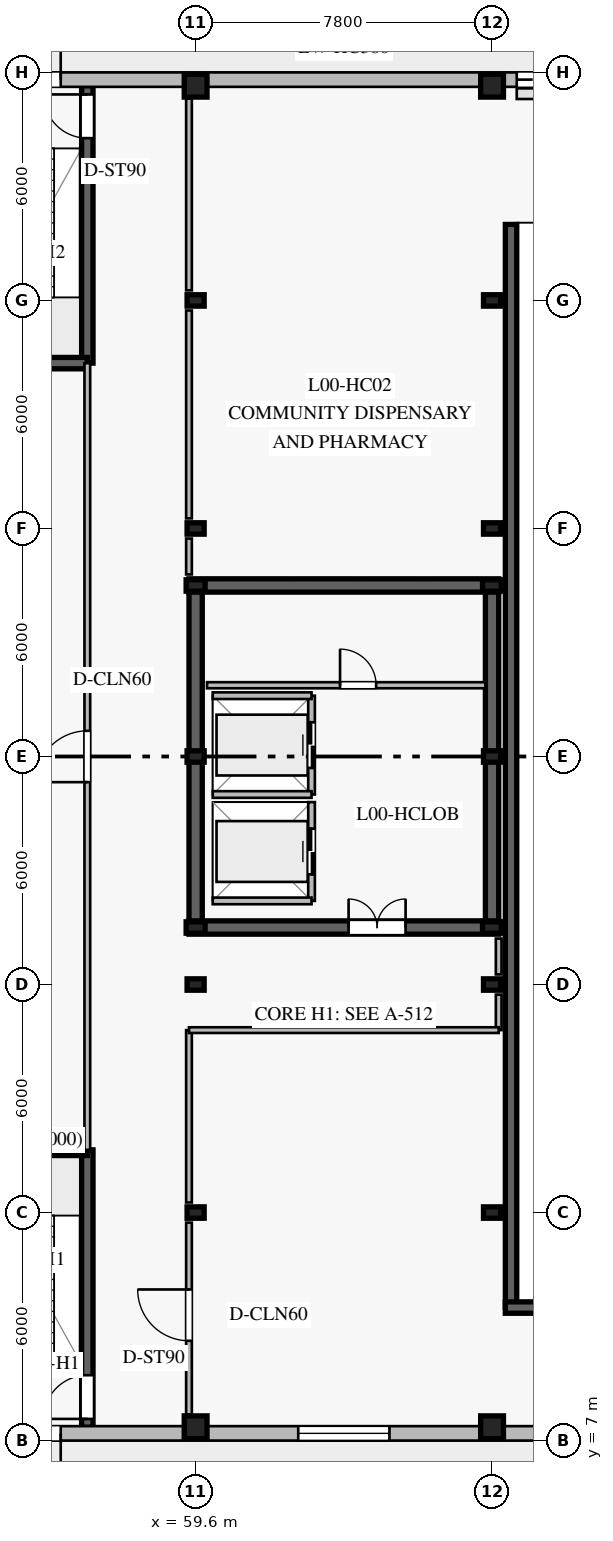
"""IFC4 building model, lengths in metres.
Left out: names, types, materials, properties, quantities, classifications, styles, units other than length and angle.
Written with IfcOpenShell. Run it as: python <this file> out.ifc"""

import sys

from ifc_helpers import new_model, si_unit, direction, frame, frame_2d, origin, origin_2d, place, context, subcontext, project, spatial, rectangle, i_section, extrude, element, fill, save


model = new_model("IFC4")
c1 = context("Model", 3, precision=1e-05, world=origin(), true_north=direction((0.0, 1.0)))
c2 = subcontext(c1, "Body", "Model", "MODEL_VIEW")
j1 = project(units=[si_unit("LENGTHUNIT", "METRE"), si_unit("PLANEANGLEUNIT", "RADIAN")], contexts=[c1])
p1 = place(None, origin())
s1 = spatial("IfcSite", under=j1, at=p1, CompositionType="ELEMENT")
p2 = place(p1, origin())
s2 = spatial("IfcBuilding", under=s1, at=p2, CompositionType="ELEMENT")
p3 = place(p2, origin())
s3 = spatial("IfcBuildingStorey", under=s2, at=p3, CompositionType="ELEMENT", Elevation=0.0)
p4 = place(p3, frame((67.9, 10.5, 0.0), z_axis=(0.0, 0.0, 1.0), x_axis=(0.0, 1.0, 0.0)))
e1 = element("IfcWall", 1, at=p4, inside=s3, PredefinedType="SOLIDWALL", context=c2, shape_type="SweptSolid", body=[
    extrude(rectangle(XDim=28.5, YDim=0.3, at=frame_2d((14.25, 0.0))), origin(), (0.0, 0.0, 1.0), 4.94),
])
p5 = place(p3, frame((67.75, 10.5, 0.0), z_axis=(0.0, 0.0, 1.0), x_axis=(1.0, 0.0, 0.0)))
e2 = element("IfcWall", 2, at=p5, inside=s3, PredefinedType="SOLIDWALL", context=c2, shape_type="SweptSolid", body=[
    extrude(rectangle(XDim=6.6, YDim=0.3, at=frame_2d((3.3, 0.0))), origin(), (0.0, 0.0, 1.0), 4.94),
])
p6 = place(p3, frame((59.425, 20.5, 0.0), z_axis=(0.0, 0.0, 1.0), x_axis=(1.0, 0.0, 0.0)))
e3 = element("IfcWall", 3, at=p6, inside=s3, PredefinedType="SHEAR", context=c2, shape_type="SweptSolid", body=[
    extrude(rectangle(XDim=8.15, YDim=0.35, at=frame_2d((4.075, 0.0))), origin(), (0.0, 0.0, 1.0), 4.94),
])
p7 = place(p6, frame((4.2, 0.0, 0.0)))
e4 = element("IfcOpeningElement", 4, at=p7, cuts=e3, PredefinedType="OPENING", context=c2, shape_type="SweptSolid", body=[
    extrude(rectangle(XDim=1.5, YDim=2.2, at=frame_2d((0.75, 1.1))), frame((0.0, 0.185, 0.0), z_axis=(0.0, -1.0, 0.0), x_axis=(1.0, 0.0, 0.0)), (0.0, 0.0, 1.0), 0.37),
])
p8 = place(p3, frame((67.575, 29.5, 0.0), z_axis=(0.0, 0.0, 1.0), x_axis=(-1.0, 0.0, 0.0)))
e5 = element("IfcWall", 5, at=p8, inside=s3, PredefinedType="SHEAR", context=c2, shape_type="SweptSolid", body=[
    extrude(rectangle(XDim=8.15, YDim=0.35, at=frame_2d((4.075, 0.0))), origin(), (0.0, 0.0, 1.0), 4.94),
])
for number, where, z_axis, x_axis in (
    (6, (59.6, 29.325, 0.0), (0.0, 0.0, 1.0), (0.0, -1.0, 0.0)),
    (7, (67.4, 20.675, 0.0), (0.0, 0.0, 1.0), (0.0, 1.0, 0.0)),
):
    element("IfcWall", number, at=place(p3, frame(where, z_axis=z_axis, x_axis=x_axis)), inside=s3, PredefinedType="SHEAR", context=c2, shape_type="SweptSolid", body=[
        extrude(rectangle(XDim=8.65, YDim=0.35, at=frame_2d((4.325, 0.0))), origin(), (0.0, 0.0, 1.0), 4.94),
    ])
for number, where, z_axis, x_axis in (
    (8, (59.6, 20.5, 0.0), (0.0, 0.0, 1.0), (1.0, 0.0, 0.0)),
    (9, (67.4, 20.5, 0.0), (0.0, 0.0, 1.0), (1.0, 0.0, 0.0)),
    (10, (67.4, 29.5, 0.0), (0.0, 0.0, 1.0), (1.0, 0.0, 0.0)),
    (11, (59.6, 29.5, 0.0), (0.0, 0.0, 1.0), (1.0, 0.0, 0.0)),
):
    element("IfcColumn", number, at=place(p3, frame(where, z_axis=z_axis, x_axis=x_axis)), inside=s3, PredefinedType="COLUMN", context=c2, shape_type="SweptSolid", body=[
        extrude(i_section(OverallWidth=0.3, OverallDepth=0.5, WebThickness=0.014, FlangeThickness=0.028, at=origin_2d()), origin(), (0.0, 0.0, 1.0), 5.2),
    ])
p9 = place(p3, frame((56.75, 7.35, 0.0), z_axis=(0.0, 0.0, 1.0), x_axis=(0.0, 1.0, 0.0)))
e12 = element("IfcWall", 12, at=p9, inside=s3, PredefinedType="SOLIDWALL", context=c2, shape_type="SweptSolid", body=[
    extrude(rectangle(XDim=7.3, YDim=0.3, at=frame_2d((3.65, 0.0))), origin(), (0.0, 0.0, 1.0), 4.94),
])
p10 = place(p9, frame((0.22, 0.0, 0.0)))
e13 = element("IfcOpeningElement", 13, at=p10, cuts=e12, PredefinedType="OPENING", context=c2, shape_type="SweptSolid", body=[
    extrude(rectangle(XDim=1.15, YDim=2.2, at=frame_2d((0.575, 1.1))), frame((0.0, 0.16, 0.0), z_axis=(0.0, -1.0, 0.0), x_axis=(1.0, 0.0, 0.0)), (0.0, 0.0, 1.0), 0.32),
])
p11 = place(p3, frame((53.4, 14.65, 0.0), z_axis=(0.0, 0.0, 1.0), x_axis=(1.0, 0.0, 0.0)))
e14 = element("IfcWall", 14, at=p11, inside=s3, PredefinedType="SOLIDWALL", context=c2, shape_type="SweptSolid", body=[
    extrude(rectangle(XDim=3.35, YDim=0.3, at=frame_2d((1.675, 0.0))), origin(), (0.0, 0.0, 1.0), 4.94),
])
p12 = place(p3, frame((56.75, 35.35, 0.0), z_axis=(0.0, 0.0, 1.0), x_axis=(0.0, 1.0, 0.0)))
e15 = element("IfcWall", 15, at=p12, inside=s3, PredefinedType="SOLIDWALL", context=c2, shape_type="SweptSolid", body=[
    extrude(rectangle(XDim=7.3, YDim=0.3, at=frame_2d((3.65, 0.0))), origin(), (0.0, 0.0, 1.0), 4.94),
])
p13 = place(p12, frame((5.92, 0.0, 0.0)))
e16 = element("IfcOpeningElement", 16, at=p13, cuts=e15, PredefinedType="OPENING", context=c2, shape_type="SweptSolid", body=[
    extrude(rectangle(XDim=1.15, YDim=2.2, at=frame_2d((0.575, 1.1))), frame((0.0, 0.16, 0.0), z_axis=(0.0, -1.0, 0.0), x_axis=(1.0, 0.0, 0.0)), (0.0, 0.0, 1.0), 0.32),
])
p14 = place(p3, frame((53.4, 35.35, 0.0), z_axis=(0.0, 0.0, 1.0), x_axis=(1.0, 0.0, 0.0)))
e17 = element("IfcWall", 17, at=p14, inside=s3, PredefinedType="SOLIDWALL", context=c2, shape_type="SweptSolid", body=[
    extrude(rectangle(XDim=3.35, YDim=0.3, at=frame_2d((1.675, 0.0))), origin(), (0.0, 0.0, 1.0), 4.94),
])
p15 = place(p3, frame((59.6, 7.35, 0.0), z_axis=(0.0, 0.0, 1.0), x_axis=(1.0, 0.0, 0.0)))
e18 = element("IfcColumn", 18, at=p15, inside=s3, PredefinedType="COLUMN", context=c2, shape_type="SweptSolid", body=[
    extrude(rectangle(XDim=0.6, YDim=0.6, at=origin_2d()), origin(), (0.0, 0.0, 1.0), 5.2),
])
for number, where, z_axis, x_axis in (
    (19, (59.6, 13.0, 0.0), (0.0, 0.0, 1.0), (1.0, 0.0, 0.0)),
    (20, (59.6, 19.0, 0.0), (0.0, 0.0, 1.0), (1.0, 0.0, 0.0)),
    (21, (59.6, 25.0, 0.0), (0.0, 0.0, 1.0), (1.0, 0.0, 0.0)),
    (22, (59.6, 31.0, 0.0), (0.0, 0.0, 1.0), (1.0, 0.0, 0.0)),
    (23, (59.6, 37.0, 0.0), (0.0, 0.0, 1.0), (1.0, 0.0, 0.0)),
):
    element("IfcColumn", number, at=place(p3, frame(where, z_axis=z_axis, x_axis=x_axis)), inside=s3, PredefinedType="COLUMN", context=c2, shape_type="SweptSolid", body=[
        extrude(i_section(OverallWidth=0.3, OverallDepth=0.45, WebThickness=0.014, FlangeThickness=0.026, at=origin_2d()), origin(), (0.0, 0.0, 1.0), 5.2),
    ])
for number, where, z_axis, x_axis in (
    (24, (59.6, 42.65, 0.0), (0.0, 0.0, 1.0), (1.0, 0.0, 0.0)),
    (25, (67.4, 7.35, 0.0), (0.0, 0.0, 1.0), (1.0, 0.0, 0.0)),
):
    element("IfcColumn", number, at=place(p3, frame(where, z_axis=z_axis, x_axis=x_axis)), inside=s3, PredefinedType="COLUMN", context=c2, shape_type="SweptSolid", body=[
        extrude(rectangle(XDim=0.6, YDim=0.6, at=origin_2d()), origin(), (0.0, 0.0, 1.0), 5.2),
    ])
for number, where, z_axis, x_axis in (
    (26, (67.4, 13.0, 0.0), (0.0, 0.0, 1.0), (1.0, 0.0, 0.0)),
    (27, (67.4, 19.0, 0.0), (0.0, 0.0, 1.0), (1.0, 0.0, 0.0)),
    (28, (67.4, 25.0, 0.0), (0.0, 0.0, 1.0), (1.0, 0.0, 0.0)),
    (29, (67.4, 31.0, 0.0), (0.0, 0.0, 1.0), (1.0, 0.0, 0.0)),
    (30, (67.4, 37.0, 0.0), (0.0, 0.0, 1.0), (1.0, 0.0, 0.0)),
):
    element("IfcColumn", number, at=place(p3, frame(where, z_axis=z_axis, x_axis=x_axis)), inside=s3, PredefinedType="COLUMN", context=c2, shape_type="SweptSolid", body=[
        extrude(i_section(OverallWidth=0.3, OverallDepth=0.45, WebThickness=0.014, FlangeThickness=0.026, at=origin_2d()), origin(), (0.0, 0.0, 1.0), 5.2),
    ])
p16 = place(p3, frame((67.4, 42.65, 0.0), z_axis=(0.0, 0.0, 1.0), x_axis=(1.0, 0.0, 0.0)))
e31 = element("IfcColumn", 31, at=p16, inside=s3, PredefinedType="COLUMN", context=c2, shape_type="SweptSolid", body=[
    extrude(rectangle(XDim=0.6, YDim=0.6, at=origin_2d()), origin(), (0.0, 0.0, 1.0), 5.2),
])
p17 = place(p3, frame((75.0, 7.19, 0.0), z_axis=(0.0, 0.0, 1.0), x_axis=(-1.0, 0.0, 0.0)))
e32 = element("IfcWall", 32, at=p17, inside=s3, PredefinedType="STANDARD", context=c2, shape_type="SweptSolid", body=[
    extrude(rectangle(XDim=23.0, YDim=0.38, at=frame_2d((11.5, 0.0))), origin(), (0.0, 0.0, 1.0), 4.94),
])
p18 = place(p17, frame((18.95, 0.0, 0.0)))
e33 = element("IfcOpeningElement", 33, at=p18, cuts=e32, PredefinedType="OPENING", context=c2, shape_type="SweptSolid", body=[
    extrude(rectangle(XDim=2.0, YDim=2.4, at=frame_2d((1.0, 1.2))), frame((0.0, 0.2, 0.0), z_axis=(0.0, -1.0, 0.0), x_axis=(1.0, 0.0, 0.0)), (0.0, 0.0, 1.0), 0.4),
])
p19 = place(p17, frame((10.3, 0.0, 0.95)))
e34 = element("IfcOpeningElement", 34, at=p19, cuts=e32, PredefinedType="OPENING", context=c2, shape_type="SweptSolid", body=[
    extrude(rectangle(XDim=2.4, YDim=1.8, at=frame_2d((1.2, 0.9))), frame((0.0, 0.2, 0.0), z_axis=(0.0, -1.0, 0.0), x_axis=(1.0, 0.0, 0.0)), (0.0, 0.0, 1.0), 0.4),
])
p20 = place(p3, frame((52.0, 42.81, 0.0), z_axis=(0.0, 0.0, 1.0), x_axis=(1.0, 0.0, 0.0)))
e35 = element("IfcWall", 35, at=p20, inside=s3, PredefinedType="STANDARD", context=c2, shape_type="SweptSolid", body=[
    extrude(rectangle(XDim=23.0, YDim=0.38, at=frame_2d((11.5, 0.0))), origin(), (0.0, 0.0, 1.0), 4.94),
])
p21 = place(p20, frame((2.05, 0.0, 0.0)))
e36 = element("IfcOpeningElement", 36, at=p21, cuts=e35, PredefinedType="OPENING", context=c2, shape_type="SweptSolid", body=[
    extrude(rectangle(XDim=2.0, YDim=2.4, at=frame_2d((1.0, 1.2))), frame((0.0, 0.2, 0.0), z_axis=(0.0, -1.0, 0.0), x_axis=(1.0, 0.0, 0.0)), (0.0, 0.0, 1.0), 0.4),
])
p22 = place(p20, frame((16.05, 0.0, 0.0)))
e37 = element("IfcOpeningElement", 37, at=p22, cuts=e35, PredefinedType="OPENING", context=c2, shape_type="SweptSolid", body=[
    extrude(rectangle(XDim=6.0, YDim=2.6, at=frame_2d((3.0, 1.3))), frame((0.0, 0.2, 0.0), z_axis=(0.0, -1.0, 0.0), x_axis=(1.0, 0.0, 0.0)), (0.0, 0.0, 1.0), 0.4),
])
p23 = place(p3, frame((62.65, 21.2, 0.0), z_axis=(0.0, 0.0, 1.0), x_axis=(0.0, 1.0, 0.0)))
e38 = element("IfcWall", 38, at=p23, inside=s3, PredefinedType="PARTITIONING", context=c2, shape_type="SweptSolid", body=[
    extrude(rectangle(XDim=2.6, YDim=0.175, at=frame_2d((1.3, 0.0))), origin(), (0.0, 0.0, 1.0), 4.94),
])
p24 = place(p23, frame((0.7, 0.0, 0.0)))
e39 = element("IfcOpeningElement", 39, at=p24, cuts=e38, PredefinedType="OPENING", context=c2, shape_type="SweptSolid", body=[
    extrude(rectangle(XDim=1.2, YDim=2.2, at=frame_2d((0.6, 1.1))), frame((0.0, 0.098, 0.0), z_axis=(0.0, -1.0, 0.0), x_axis=(1.0, 0.0, 0.0)), (0.0, 0.0, 1.0), 0.195),
])
p25 = place(p3, frame((60.05, 21.2, 0.0), z_axis=(0.0, 0.0, 1.0), x_axis=(1.0, 0.0, 0.0)))
e40 = element("IfcWall", 40, at=p25, inside=s3, PredefinedType="PARTITIONING", context=c2, shape_type="SweptSolid", body=[
    extrude(rectangle(XDim=2.6, YDim=0.175, at=frame_2d((1.3, 0.0))), origin(), (0.0, 0.0, 1.0), 4.94),
])
p26 = place(p3, frame((62.65, 24.0, 0.0), z_axis=(0.0, 0.0, 1.0), x_axis=(0.0, 1.0, 0.0)))
e41 = element("IfcWall", 41, at=p26, inside=s3, PredefinedType="PARTITIONING", context=c2, shape_type="SweptSolid", body=[
    extrude(rectangle(XDim=2.6, YDim=0.175, at=frame_2d((1.3, 0.0))), origin(), (0.0, 0.0, 1.0), 4.58),
])
p27 = place(p26, frame((0.7, 0.0, 0.0)))
e42 = element("IfcOpeningElement", 42, at=p27, cuts=e41, PredefinedType="OPENING", context=c2, shape_type="SweptSolid", body=[
    extrude(rectangle(XDim=1.2, YDim=2.2, at=frame_2d((0.6, 1.1))), frame((0.0, 0.098, 0.0), z_axis=(0.0, -1.0, 0.0), x_axis=(1.0, 0.0, 0.0)), (0.0, 0.0, 1.0), 0.195),
])
for number, where, z_axis, x_axis in (
    (43, (60.05, 24.0, 0.0), (0.0, 0.0, 1.0), (1.0, 0.0, 0.0)),
    (44, (60.05, 26.6, 0.0), (0.0, 0.0, 1.0), (1.0, 0.0, 0.0)),
):
    element("IfcWall", number, at=place(p3, frame(where, z_axis=z_axis, x_axis=x_axis)), inside=s3, PredefinedType="PARTITIONING", context=c2, shape_type="SweptSolid", body=[
        extrude(rectangle(XDim=2.6, YDim=0.175, at=frame_2d((1.3, 0.0))), origin(), (0.0, 0.0, 1.0), 4.94),
    ])
p28 = place(p3, frame((59.9, 26.875, 0.0), z_axis=(0.0, 0.0, 1.0), x_axis=(1.0, 0.0, 0.0)))
e45 = element("IfcWall", 45, at=p28, inside=s3, PredefinedType="PLUMBINGWALL", context=c2, shape_type="SweptSolid", body=[
    extrude(rectangle(XDim=7.325, YDim=0.16, at=frame_2d((3.663, 0.0))), origin(), (0.0, 0.0, 1.0), 4.58),
])
p29 = place(p28, frame((3.5, 0.0, 0.0)))
e46 = element("IfcOpeningElement", 46, at=p29, cuts=e45, PredefinedType="OPENING", context=c2, shape_type="SweptSolid", body=[
    extrude(rectangle(XDim=0.95, YDim=2.1, at=frame_2d((0.475, 1.05))), frame((0.0, 0.09, 0.0), z_axis=(0.0, -1.0, 0.0), x_axis=(1.0, 0.0, 0.0)), (0.0, 0.0, 1.0), 0.18),
])
p30 = place(p3, frame((56.75, 14.65, 0.0), z_axis=(0.0, 0.0, 1.0), x_axis=(0.0, 1.0, 0.0)))
e47 = element("IfcWall", 47, at=p30, inside=s3, PredefinedType="PARTITIONING", context=c2, shape_type="SweptSolid", body=[
    extrude(rectangle(XDim=20.7, YDim=0.15, at=frame_2d((10.35, 0.0))), origin(), (0.0, 0.0, 1.0), 4.94),
])
p31 = place(p30, frame((9.675, 0.0, 0.0)))
e48 = element("IfcOpeningElement", 48, at=p31, cuts=e47, PredefinedType="OPENING", context=c2, shape_type="SweptSolid", body=[
    extrude(rectangle(XDim=1.35, YDim=2.2, at=frame_2d((0.675, 1.1))), frame((0.0, 0.085, 0.0), z_axis=(0.0, -1.0, 0.0), x_axis=(1.0, 0.0, 0.0)), (0.0, 0.0, 1.0), 0.17),
])
p32 = place(p3, frame((59.425, 7.69, 0.0), z_axis=(0.0, 0.0, 1.0), x_axis=(0.0, 1.0, 0.0)))
e49 = element("IfcWall", 49, at=p32, inside=s3, PredefinedType="PARTITIONING", context=c2, shape_type="SweptSolid", body=[
    extrude(rectangle(XDim=5.045, YDim=0.15, at=frame_2d((2.522, 0.0))), origin(), (0.0, 0.0, 1.0), 4.58),
])
p33 = place(p32, frame((1.936, 0.0, 0.0)))
e50 = element("IfcOpeningElement", 50, at=p33, cuts=e49, PredefinedType="OPENING", context=c2, shape_type="SweptSolid", body=[
    extrude(rectangle(XDim=1.35, YDim=2.2, at=frame_2d((0.675, 1.1))), frame((0.0, 0.085, 0.0), z_axis=(0.0, -1.0, 0.0), x_axis=(1.0, 0.0, 0.0)), (0.0, 0.0, 1.0), 0.17),
])
p34 = place(p3, frame((59.425, 13.265, 0.0), z_axis=(0.0, 0.0, 1.0), x_axis=(0.0, 1.0, 0.0)))
e51 = element("IfcWall", 51, at=p34, inside=s3, PredefinedType="PARTITIONING", context=c2, shape_type="SweptSolid", body=[
    extrude(rectangle(XDim=4.535, YDim=0.15, at=frame_2d((2.268, 0.0))), origin(), (0.0, 0.0, 1.0), 4.58),
])
p35 = place(p3, frame((59.425, 29.79, 0.0), z_axis=(0.0, 0.0, 1.0), x_axis=(0.0, 1.0, 0.0)))
e52 = element("IfcWall", 52, at=p35, inside=s3, PredefinedType="PARTITIONING", context=c2, shape_type="SweptSolid", body=[
    extrude(rectangle(XDim=0.945, YDim=0.15, at=frame_2d((0.473, 0.0))), origin(), (0.0, 0.0, 1.0), 4.58),
])
p36 = place(p3, frame((59.425, 31.265, 0.0), z_axis=(0.0, 0.0, 1.0), x_axis=(0.0, 1.0, 0.0)))
e53 = element("IfcWall", 53, at=p36, inside=s3, PredefinedType="PARTITIONING", context=c2, shape_type="SweptSolid", body=[
    extrude(rectangle(XDim=5.47, YDim=0.15, at=frame_2d((2.735, 0.0))), origin(), (0.0, 0.0, 1.0), 4.58),
])
p37 = place(p3, frame((59.425, 37.265, 0.0), z_axis=(0.0, 0.0, 1.0), x_axis=(0.0, 1.0, 0.0)))
e54 = element("IfcWall", 54, at=p37, inside=s3, PredefinedType="PARTITIONING", context=c2, shape_type="SweptSolid", body=[
    extrude(rectangle(XDim=5.045, YDim=0.15, at=frame_2d((2.522, 0.0))), origin(), (0.0, 0.0, 1.0), 4.58),
])
p38 = place(p3, frame((67.575, 17.8, 0.0), z_axis=(0.0, 0.0, 1.0), x_axis=(0.0, 1.0, 0.0)))
e55 = element("IfcWall", 55, at=p38, inside=s3, PredefinedType="PARTITIONING", context=c2, shape_type="SweptSolid", body=[
    extrude(rectangle(XDim=0.935, YDim=0.15, at=frame_2d((0.468, 0.0))), origin(), (0.0, 0.0, 1.0), 4.58),
])
p39 = place(p3, frame((67.575, 19.265, 0.0), z_axis=(0.0, 0.0, 1.0), x_axis=(0.0, 1.0, 0.0)))
e56 = element("IfcWall", 56, at=p39, inside=s3, PredefinedType="PARTITIONING", context=c2, shape_type="SweptSolid", body=[
    extrude(rectangle(XDim=0.945, YDim=0.15, at=frame_2d((0.473, 0.0))), origin(), (0.0, 0.0, 1.0), 4.58),
])
p40 = place(p3, frame((59.425, 17.8, 0.0), z_axis=(0.0, 0.0, 1.0), x_axis=(1.0, 0.0, 0.0)))
e57 = element("IfcWall", 57, at=p40, inside=s3, PredefinedType="PARTITIONING", context=c2, shape_type="SweptSolid", body=[
    extrude(rectangle(XDim=8.15, YDim=0.15, at=frame_2d((4.075, 0.0))), origin(), (0.0, 0.0, 1.0), 4.58),
])
p41 = place(p18, origin())
e58 = element("IfcDoor", 58, at=p41, inside=s3, OperationType="DOUBLE_DOOR_SINGLE_SWING", PredefinedType="DOOR", context=c2, shape_type="SweptSolid", body=[
    extrude(rectangle(XDim=2.0, YDim=2.4, at=frame_2d((1.0, 1.2))), frame((0.0, 0.025, 0.0), z_axis=(0.0, -1.0, 0.0), x_axis=(1.0, 0.0, 0.0)), (0.0, 0.0, 1.0), 0.05),
])
fill(e33, e58)
p42 = place(p21, origin())
e59 = element("IfcDoor", 59, at=p42, inside=s3, OperationType="DOUBLE_DOOR_SINGLE_SWING", PredefinedType="DOOR", context=c2, shape_type="SweptSolid", body=[
    extrude(rectangle(XDim=2.0, YDim=2.4, at=frame_2d((1.0, 1.2))), frame((0.0, 0.025, 0.0), z_axis=(0.0, -1.0, 0.0), x_axis=(1.0, 0.0, 0.0)), (0.0, 0.0, 1.0), 0.05),
])
fill(e36, e59)
p43 = place(p22, origin())
e60 = element("IfcDoor", 60, at=p43, inside=s3, OperationType="ROLLINGUP", PredefinedType="GATE", context=c2, shape_type="SweptSolid", body=[
    extrude(rectangle(XDim=6.0, YDim=2.6, at=frame_2d((3.0, 1.3))), frame((0.0, 0.025, 0.0), z_axis=(0.0, -1.0, 0.0), x_axis=(1.0, 0.0, 0.0)), (0.0, 0.0, 1.0), 0.05),
])
fill(e37, e60)
p44 = place(p19, origin())
e61 = element("IfcWindow", 61, at=p44, inside=s3, PartitioningType="TRIPLE_PANEL_VERTICAL", PredefinedType="WINDOW", context=c2, shape_type="SweptSolid", body=[
    extrude(rectangle(XDim=2.4, YDim=1.8, at=frame_2d((1.2, 0.9))), frame((0.0, 0.03, 0.0), z_axis=(0.0, -1.0, 0.0), x_axis=(1.0, 0.0, 0.0)), (0.0, 0.0, 1.0), 0.06),
])
fill(e34, e61)
p45 = place(p24, origin())
e62 = element("IfcDoor", 62, at=p45, inside=s3, OperationType="DOUBLE_DOOR_SLIDING", PredefinedType="DOOR", context=c2, shape_type="SweptSolid", body=[
    extrude(rectangle(XDim=1.2, YDim=2.2, at=frame_2d((0.6, 1.1))), frame((0.0, 0.025, 0.0), z_axis=(0.0, -1.0, 0.0), x_axis=(1.0, 0.0, 0.0)), (0.0, 0.0, 1.0), 0.05),
])
fill(e39, e62)
p46 = place(p27, origin())
e63 = element("IfcDoor", 63, at=p46, inside=s3, OperationType="DOUBLE_DOOR_SLIDING", PredefinedType="DOOR", context=c2, shape_type="SweptSolid", body=[
    extrude(rectangle(XDim=1.2, YDim=2.2, at=frame_2d((0.6, 1.1))), frame((0.0, 0.025, 0.0), z_axis=(0.0, -1.0, 0.0), x_axis=(1.0, 0.0, 0.0)), (0.0, 0.0, 1.0), 0.05),
])
fill(e42, e63)
p47 = place(p10, origin())
e64 = element("IfcDoor", 64, at=p47, inside=s3, OperationType="SINGLE_SWING_LEFT", PredefinedType="DOOR", context=c2, shape_type="SweptSolid", body=[
    extrude(rectangle(XDim=1.15, YDim=2.2, at=frame_2d((0.575, 1.1))), frame((0.0, 0.025, 0.0), z_axis=(0.0, -1.0, 0.0), x_axis=(1.0, 0.0, 0.0)), (0.0, 0.0, 1.0), 0.05),
])
fill(e13, e64)
p48 = place(p13, origin())
e65 = element("IfcDoor", 65, at=p48, inside=s3, OperationType="SINGLE_SWING_RIGHT", PredefinedType="DOOR", context=c2, shape_type="SweptSolid", body=[
    extrude(rectangle(XDim=1.15, YDim=2.2, at=frame_2d((0.575, 1.1))), frame((0.0, 0.025, 0.0), z_axis=(0.0, -1.0, 0.0), x_axis=(1.0, 0.0, 0.0)), (0.0, 0.0, 1.0), 0.05),
])
fill(e16, e65)
p49 = place(p7, origin())
e66 = element("IfcDoor", 66, at=p49, inside=s3, OperationType="DOUBLE_DOOR_SINGLE_SWING", PredefinedType="DOOR", context=c2, shape_type="SweptSolid", body=[
    extrude(rectangle(XDim=1.5, YDim=2.2, at=frame_2d((0.75, 1.1))), frame((0.0, 0.025, 0.0), z_axis=(0.0, -1.0, 0.0), x_axis=(1.0, 0.0, 0.0)), (0.0, 0.0, 1.0), 0.05),
])
fill(e4, e66)
p50 = place(p29, origin())
e67 = element("IfcDoor", 67, at=p50, inside=s3, OperationType="SINGLE_SWING_LEFT", PredefinedType="DOOR", context=c2, shape_type="SweptSolid", body=[
    extrude(rectangle(XDim=0.95, YDim=2.1, at=frame_2d((0.475, 1.05))), frame((0.0, 0.025, 0.0), z_axis=(0.0, -1.0, 0.0), x_axis=(1.0, 0.0, 0.0)), (0.0, 0.0, 1.0), 0.05),
])
fill(e46, e67)
p51 = place(p31, origin())
e68 = element("IfcDoor", 68, at=p51, inside=s3, OperationType="SINGLE_SWING_LEFT", PredefinedType="DOOR", context=c2, shape_type="SweptSolid", body=[
    extrude(rectangle(XDim=1.35, YDim=2.2, at=frame_2d((0.675, 1.1))), frame((0.0, 0.025, 0.0), z_axis=(0.0, -1.0, 0.0), x_axis=(1.0, 0.0, 0.0)), (0.0, 0.0, 1.0), 0.05),
])
fill(e48, e68)
p52 = place(p33, origin())
e69 = element("IfcDoor", 69, at=p52, inside=s3, OperationType="SINGLE_SWING_RIGHT", PredefinedType="DOOR", context=c2, shape_type="SweptSolid", body=[
    extrude(rectangle(XDim=1.35, YDim=2.2, at=frame_2d((0.675, 1.1))), frame((0.0, 0.025, 0.0), z_axis=(0.0, -1.0, 0.0), x_axis=(1.0, 0.0, 0.0)), (0.0, 0.0, 1.0), 0.05),
])
fill(e50, e69)
save(model, sys.argv[1])
